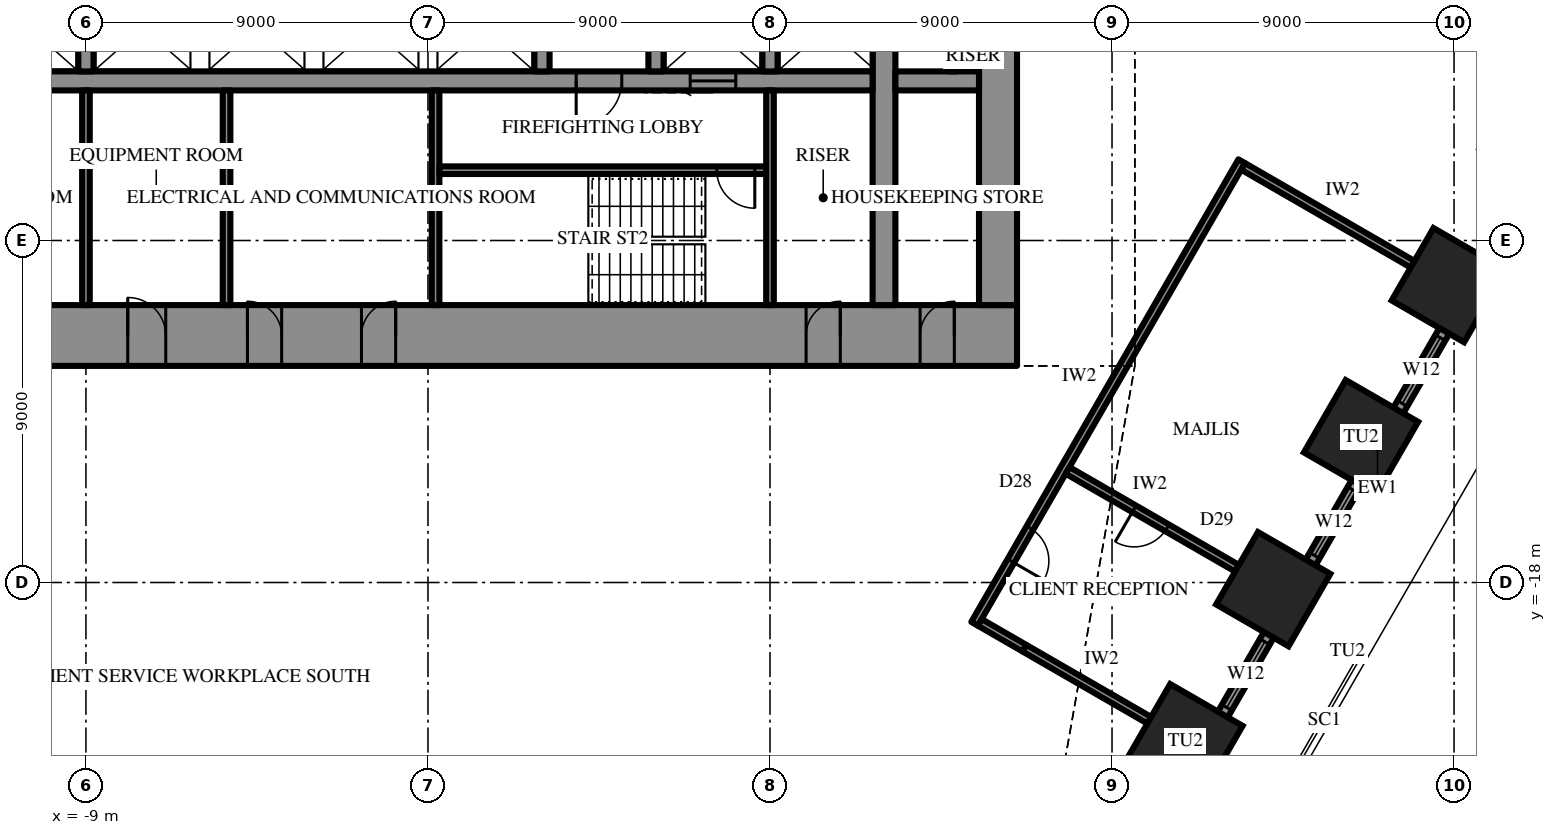
"""IFC4 building model, lengths in metres.
Left out: names, types, materials, properties, quantities, classifications, styles, units other than length and angle.
Written with IfcOpenShell. Run it as: python <this file> out.ifc"""

import sys

from ifc_helpers import new_model, si_unit, direction, frame, frame_2d, origin, origin_2d, place, context, subcontext, project, spatial, rectangle, hollow_rectangle, extrude, element, fill, save


model = new_model("IFC4")
c1 = context("Model", 3, precision=1e-05, world=origin(), true_north=direction((0.0, 1.0)))
c2 = subcontext(c1, "Body", "Model", "MODEL_VIEW")
j1 = project(units=[si_unit("LENGTHUNIT", "METRE"), si_unit("PLANEANGLEUNIT", "RADIAN")], contexts=[c1])
p1 = place(None, origin())
s1 = spatial("IfcSite", under=j1, at=p1, CompositionType="ELEMENT")
p2 = place(p1, origin())
s2 = spatial("IfcBuilding", under=s1, at=p2, CompositionType="ELEMENT")
p3 = place(p2, frame((0.0, 0.0, 215.5)))
s3 = spatial("IfcBuildingStorey", under=s2, at=p3, CompositionType="ELEMENT", Elevation=215.5)
for number, where, z_axis, x_axis in (
    (1, (19.933, -22.175, 0.0), (0.0, 0.0, 1.0), (0.5, 0.866, 0.0)),
    (2, (22.242, -18.175, 0.0), (0.0, 0.0, 1.0), (0.5, 0.866, 0.0)),
    (3, (24.552, -14.175, 0.0), (0.0, 0.0, 1.0), (0.5, 0.866, 0.0)),
    (4, (26.861, -10.175, 0.0), (0.0, 0.0, 1.0), (0.5, 0.866, 0.0)),
):
    element("IfcColumn", number, at=place(p3, frame(where, z_axis=z_axis, x_axis=x_axis)), inside=s3, PredefinedType="COLUMN", context=c2, shape_type="SweptSolid", body=[
        extrude(hollow_rectangle(XDim=2.2, YDim=2.2, WallThickness=0.12, at=origin_2d()), origin(), (0.0, 0.0, 1.0), 4.2),
    ])
p4 = place(p3, frame((15.5, -11.5, 0.0), z_axis=(0.0, 0.0, 1.0), x_axis=(-1.0, 0.0, 0.0)))
e5 = element("IfcWall", 5, at=p4, inside=s3, PredefinedType="SHEAR", context=c2, shape_type="SweptSolid", body=[
    extrude(rectangle(XDim=31.0, YDim=1.6, at=frame_2d((15.5, 0.0))), origin(), (0.0, 0.0, 1.0), 4.2),
])
p5 = place(p4, frame((16.35, 0.0, 0.0)))
e6 = element("IfcOpeningElement", 6, at=p5, cuts=e5, PredefinedType="OPENING", context=c2, shape_type="SweptSolid", body=[
    extrude(rectangle(XDim=0.9, YDim=2.2, at=frame_2d((0.45, 1.1))), frame((0.0, 0.81, 0.0), z_axis=(0.0, -1.0, 0.0), x_axis=(1.0, 0.0, 0.0)), (0.0, 0.0, 1.0), 1.62),
])
p6 = place(p4, frame((19.35, 0.0, 0.0)))
e7 = element("IfcOpeningElement", 7, at=p6, cuts=e5, PredefinedType="OPENING", context=c2, shape_type="SweptSolid", body=[
    extrude(rectangle(XDim=0.9, YDim=2.2, at=frame_2d((0.45, 1.1))), frame((0.0, 0.81, 0.0), z_axis=(0.0, -1.0, 0.0), x_axis=(1.0, 0.0, 0.0)), (0.0, 0.0, 1.0), 1.62),
])
p7 = place(p4, frame((22.4, 0.0, 0.0)))
e8 = element("IfcOpeningElement", 8, at=p7, cuts=e5, PredefinedType="OPENING", context=c2, shape_type="SweptSolid", body=[
    extrude(rectangle(XDim=1.0, YDim=2.2, at=frame_2d((0.5, 1.1))), frame((0.0, 0.81, 0.0), z_axis=(0.0, -1.0, 0.0), x_axis=(1.0, 0.0, 0.0)), (0.0, 0.0, 1.0), 1.62),
])
p8 = place(p4, frame((1.65, 0.0, 0.0)))
e9 = element("IfcOpeningElement", 9, at=p8, cuts=e5, PredefinedType="OPENING", context=c2, shape_type="SweptSolid", body=[
    extrude(rectangle(XDim=0.9, YDim=2.2, at=frame_2d((0.45, 1.1))), frame((0.0, 0.81, 0.0), z_axis=(0.0, -1.0, 0.0), x_axis=(1.0, 0.0, 0.0)), (0.0, 0.0, 1.0), 1.62),
])
p9 = place(p4, frame((4.65, 0.0, 0.0)))
e10 = element("IfcOpeningElement", 10, at=p9, cuts=e5, PredefinedType="OPENING", context=c2, shape_type="SweptSolid", body=[
    extrude(rectangle(XDim=0.9, YDim=2.2, at=frame_2d((0.45, 1.1))), frame((0.0, 0.81, 0.0), z_axis=(0.0, -1.0, 0.0), x_axis=(1.0, 0.0, 0.0)), (0.0, 0.0, 1.0), 1.62),
])
p10 = place(p4, frame((25.45, 0.0, 0.0)))
e11 = element("IfcOpeningElement", 11, at=p10, cuts=e5, PredefinedType="OPENING", context=c2, shape_type="SweptSolid", body=[
    extrude(rectangle(XDim=0.9, YDim=2.2, at=frame_2d((0.45, 1.1))), frame((0.0, 0.81, 0.0), z_axis=(0.0, -1.0, 0.0), x_axis=(1.0, 0.0, 0.0)), (0.0, 0.0, 1.0), 1.62),
])
p11 = place(p4, frame((28.45, 0.0, 0.0)))
e12 = element("IfcOpeningElement", 12, at=p11, cuts=e5, PredefinedType="OPENING", context=c2, shape_type="SweptSolid", body=[
    extrude(rectangle(XDim=0.9, YDim=2.2, at=frame_2d((0.45, 1.1))), frame((0.0, 0.81, 0.0), z_axis=(0.0, -1.0, 0.0), x_axis=(1.0, 0.0, 0.0)), (0.0, 0.0, 1.0), 1.62),
])
p12 = place(p3, frame((15.0, -10.7, 0.0), z_axis=(0.0, 0.0, 1.0), x_axis=(0.0, 1.0, 0.0)))
e13 = element("IfcWall", 13, at=p12, inside=s3, PredefinedType="SHEAR", context=c2, shape_type="SweptSolid", body=[
    extrude(rectangle(XDim=21.4, YDim=1.0, at=frame_2d((10.7, 0.0))), origin(), (0.0, 0.0, 1.0), 4.2),
])
p13 = place(p12, frame((9.8, 0.0, 0.0)))
e14 = element("IfcOpeningElement", 14, at=p13, cuts=e13, PredefinedType="OPENING", context=c2, shape_type="SweptSolid", body=[
    extrude(rectangle(XDim=1.8, YDim=2.4, at=frame_2d((0.9, 1.2))), frame((0.0, 0.51, 0.0), z_axis=(0.0, -1.0, 0.0), x_axis=(1.0, 0.0, 0.0)), (0.0, 0.0, 1.0), 1.02),
])
p14 = place(p3, frame((12.0, -10.7, 0.0), z_axis=(0.0, 0.0, 1.0), x_axis=(0.0, 1.0, 0.0)))
e15 = element("IfcWall", 15, at=p14, inside=s3, PredefinedType="SHEAR", context=c2, shape_type="SweptSolid", body=[
    extrude(rectangle(XDim=21.4, YDim=0.6, at=frame_2d((10.7, 0.0))), origin(), (0.0, 0.0, 1.0), 4.2),
])
p15 = place(p14, frame((9.8, 0.0, 0.0)))
e16 = element("IfcOpeningElement", 16, at=p15, cuts=e15, PredefinedType="OPENING", context=c2, shape_type="SweptSolid", body=[
    extrude(rectangle(XDim=1.8, YDim=2.4, at=frame_2d((0.9, 1.2))), frame((0.0, 0.31, 0.0), z_axis=(0.0, -1.0, 0.0), x_axis=(1.0, 0.0, 0.0)), (0.0, 0.0, 1.0), 0.62),
])
p16 = place(p3, frame((14.5, -4.8, 0.0), z_axis=(0.0, 0.0, 1.0), x_axis=(-1.0, 0.0, 0.0)))
e17 = element("IfcWall", 17, at=p16, inside=s3, PredefinedType="SHEAR", context=c2, shape_type="SweptSolid", body=[
    extrude(rectangle(XDim=2.2, YDim=0.5, at=frame_2d((1.1, 0.0))), origin(), (0.0, 0.0, 1.0), 4.2),
])
p17 = place(p3, frame((11.7, -4.8, 0.0), z_axis=(0.0, 0.0, 1.0), x_axis=(-1.0, 0.0, 0.0)))
e18 = element("IfcWall", 18, at=p17, inside=s3, PredefinedType="SHEAR", context=c2, shape_type="SweptSolid", body=[
    extrude(rectangle(XDim=23.4, YDim=0.5, at=frame_2d((11.7, 0.0))), origin(), (0.0, 0.0, 1.0), 4.2),
])
p18 = place(p17, frame((6.6, 0.0, 0.0)))
e19 = element("IfcOpeningElement", 19, at=p18, cuts=e18, PredefinedType="OPENING", context=c2, shape_type="SweptSolid", body=[
    extrude(rectangle(XDim=1.2, YDim=2.2, at=frame_2d((0.6, 1.1))), frame((0.0, 0.26, 0.0), z_axis=(0.0, -1.0, 0.0), x_axis=(1.0, 0.0, 0.0)), (0.0, 0.0, 1.0), 0.52),
])
p19 = place(p17, frame((3.6, 0.0, 0.0)))
e20 = element("IfcOpeningElement", 20, at=p19, cuts=e18, PredefinedType="OPENING", context=c2, shape_type="SweptSolid", body=[
    extrude(rectangle(XDim=1.2, YDim=2.2, at=frame_2d((0.6, 1.1))), frame((0.0, 0.26, 0.0), z_axis=(0.0, -1.0, 0.0), x_axis=(1.0, 0.0, 0.0)), (0.0, 0.0, 1.0), 0.52),
])
for number, where, z_axis, x_axis in (
    (21, (9.0, -2.25, 0.0), (0.0, 0.0, 1.0), (0.0, -1.0, 0.0)),
    (22, (6.0, -2.25, 0.0), (0.0, 0.0, 1.0), (0.0, -1.0, 0.0)),
    (23, (3.0, -2.25, 0.0), (0.0, 0.0, 1.0), (0.0, -1.0, 0.0)),
    (24, (-9.0, -2.25, 0.0), (0.0, 0.0, 1.0), (0.0, -1.0, 0.0)),
):
    element("IfcWall", number, at=place(p3, frame(where, z_axis=z_axis, x_axis=x_axis)), inside=s3, PredefinedType="SHEAR", context=c2, shape_type="SweptSolid", body=[
        extrude(rectangle(XDim=2.3, YDim=0.4, at=frame_2d((1.15, 0.0))), origin(), (0.0, 0.0, 1.0), 4.2),
    ])
p20 = place(p3, frame((0.2, -5.05, 0.0), z_axis=(0.0, 0.0, 1.0), x_axis=(0.0, -1.0, 0.0)))
e25 = element("IfcWall", 25, at=p20, inside=s3, PredefinedType="SHEAR", context=c2, shape_type="SweptSolid", body=[
    extrude(rectangle(XDim=5.65, YDim=0.2, at=frame_2d((2.825, 0.0))), origin(), (0.0, 0.0, 1.0), 4.2),
])
p21 = place(p3, frame((8.9, -7.15, 0.0), z_axis=(0.0, 0.0, 1.0), x_axis=(-1.0, 0.0, 0.0)))
e26 = element("IfcWall", 26, at=p21, inside=s3, PredefinedType="SHEAR", context=c2, shape_type="SweptSolid", body=[
    extrude(rectangle(XDim=8.6, YDim=0.2, at=frame_2d((4.3, 0.0))), origin(), (0.0, 0.0, 1.0), 4.2),
])
p22 = place(p21, frame((0.3, 0.0, 0.0)))
e27 = element("IfcOpeningElement", 27, at=p22, cuts=e26, PredefinedType="OPENING", context=c2, shape_type="SweptSolid", body=[
    extrude(rectangle(XDim=1.0, YDim=2.2, at=frame_2d((0.5, 1.1))), frame((0.0, 0.11, 0.0), z_axis=(0.0, -1.0, 0.0), x_axis=(1.0, 0.0, 0.0)), (0.0, 0.0, 1.0), 0.22),
])
p23 = place(p3, frame((18.057, -26.425, 0.0), z_axis=(0.0, 0.0, 1.0), x_axis=(0.500001051461, 0.866024796723, 0.0)))
e28 = element("IfcWall", 28, at=p23, inside=s3, PredefinedType="SOLIDWALL", context=c2, shape_type="SweptSolid", body=[
    extrude(rectangle(XDim=27.713, YDim=0.3, at=frame_2d((13.856, 0.0))), origin(), (0.0, 0.0, 1.0), 2.0),
])
p24 = place(p23, frame((1.309, 0.0, 0.6)))
e29 = element("IfcOpeningElement", 29, at=p24, cuts=e28, PredefinedType="OPENING", context=c2, shape_type="SweptSolid", body=[
    extrude(rectangle(XDim=2.0, YDim=1.15, at=frame_2d((1.0, 0.575))), frame((0.0, 0.16, 0.0), z_axis=(0.0, -1.0, 0.0), x_axis=(1.0, 0.0, 0.0)), (0.0, 0.0, 1.0), 0.32),
])
p25 = place(p23, frame((5.928, 0.0, 0.6)))
e30 = element("IfcOpeningElement", 30, at=p25, cuts=e28, PredefinedType="OPENING", context=c2, shape_type="SweptSolid", body=[
    extrude(rectangle(XDim=2.0, YDim=1.15, at=frame_2d((1.0, 0.575))), frame((0.0, 0.16, 0.0), z_axis=(0.0, -1.0, 0.0), x_axis=(1.0, 0.0, 0.0)), (0.0, 0.0, 1.0), 0.32),
])
p26 = place(p23, frame((10.547, 0.0, 0.6)))
e31 = element("IfcOpeningElement", 31, at=p26, cuts=e28, PredefinedType="OPENING", context=c2, shape_type="SweptSolid", body=[
    extrude(rectangle(XDim=2.0, YDim=1.15, at=frame_2d((1.0, 0.575))), frame((0.0, 0.16, 0.0), z_axis=(0.0, -1.0, 0.0), x_axis=(1.0, 0.0, 0.0)), (0.0, 0.0, 1.0), 0.32),
])
p27 = place(p23, frame((15.166, 0.0, 0.6)))
e32 = element("IfcOpeningElement", 32, at=p27, cuts=e28, PredefinedType="OPENING", context=c2, shape_type="SweptSolid", body=[
    extrude(rectangle(XDim=2.0, YDim=1.15, at=frame_2d((1.0, 0.575))), frame((0.0, 0.16, 0.0), z_axis=(0.0, -1.0, 0.0), x_axis=(1.0, 0.0, 0.0)), (0.0, 0.0, 1.0), 0.32),
])
p28 = place(p23, frame((19.785, 0.0, 0.6)))
e33 = element("IfcOpeningElement", 33, at=p28, cuts=e28, PredefinedType="OPENING", context=c2, shape_type="SweptSolid", body=[
    extrude(rectangle(XDim=2.0, YDim=1.15, at=frame_2d((1.0, 0.575))), frame((0.0, 0.16, 0.0), z_axis=(0.0, -1.0, 0.0), x_axis=(1.0, 0.0, 0.0)), (0.0, 0.0, 1.0), 0.32),
])
p29 = place(p23, frame((24.403, 0.0, 0.6)))
e34 = element("IfcOpeningElement", 34, at=p29, cuts=e28, PredefinedType="OPENING", context=c2, shape_type="SweptSolid", body=[
    extrude(rectangle(XDim=2.0, YDim=1.15, at=frame_2d((1.0, 0.575))), frame((0.0, 0.16, 0.0), z_axis=(0.0, -1.0, 0.0), x_axis=(1.0, 0.0, 0.0)), (0.0, 0.0, 1.0), 0.32),
])
for number, where, z_axis, x_axis in (
    (35, (9.0, -5.05, 0.0), (0.0, 0.0, 1.0), (0.0, -1.0, 0.0)),
    (36, (-9.0, -5.05, 0.0), (0.0, 0.0, 1.0), (0.0, -1.0, 0.0)),
    (37, (-5.3, -5.05, 0.0), (0.0, 0.0, 1.0), (0.0, -1.0, 0.0)),
):
    element("IfcWall", number, at=place(p3, frame(where, z_axis=z_axis, x_axis=x_axis)), inside=s3, PredefinedType="PARTITIONING", context=c2, shape_type="SweptSolid", body=[
        extrude(rectangle(XDim=5.65, YDim=0.2, at=frame_2d((2.825, 0.0))), origin(), (0.0, 0.0, 1.0), 4.0),
    ])
p30 = place(p3, frame((13.8, -3.55, 0.0), z_axis=(0.0, 0.0, 1.0), x_axis=(0.0, -1.0, 0.0)))
e38 = element("IfcWall", 38, at=p30, inside=s3, PredefinedType="PARTITIONING", context=c2, shape_type="SweptSolid", body=[
    extrude(rectangle(XDim=1.0, YDim=0.2, at=frame_2d((0.5, 0.0))), origin(), (0.0, 0.0, 1.0), 4.0),
])
p31 = place(p3, frame((14.384, -19.087, 0.0), z_axis=(0.0, 0.0, 1.0), x_axis=(0.499989069193, 0.866031714597, 0.0)))
e39 = element("IfcWall", 39, at=p31, inside=s3, PredefinedType="PARTITIONING", context=c2, shape_type="SweptSolid", body=[
    extrude(rectangle(XDim=14.056, YDim=0.2, at=frame_2d((7.028, 0.0))), origin(), (0.0, 0.0, 1.0), 4.0),
])
p32 = place(p31, frame((1.909, 0.0, 0.0)))
e40 = element("IfcOpeningElement", 40, at=p32, cuts=e39, PredefinedType="OPENING", context=c2, shape_type="SweptSolid", body=[
    extrude(rectangle(XDim=1.0, YDim=2.2, at=frame_2d((0.5, 1.1))), frame((0.0, 0.11, 0.0), z_axis=(0.0, -1.0, 0.0), x_axis=(1.0, 0.0, 0.0)), (0.0, 0.0, 1.0), 0.22),
])
p33 = place(p3, frame((14.52, -19.05, 0.0), z_axis=(0.0, 0.0, 1.0), x_axis=(0.866041729639, -0.499971721724, 0.0)))
e41 = element("IfcWall", 41, at=p33, inside=s3, PredefinedType="PARTITIONING", context=c2, shape_type="SweptSolid", body=[
    extrude(rectangle(XDim=1.356, YDim=0.2, at=frame_2d((0.678, 0.0))), origin(), (0.0, 0.0, 1.0), 4.0),
])
p34 = place(p3, frame((15.695, -19.728, 0.0), z_axis=(0.0, 0.0, 1.0), x_axis=(0.866036622013, -0.499980568954, 0.0)))
e42 = element("IfcWall", 42, at=p34, inside=s3, PredefinedType="PARTITIONING", context=c2, shape_type="SweptSolid", body=[
    extrude(rectangle(XDim=3.794, YDim=0.2, at=frame_2d((1.897, 0.0))), origin(), (0.0, 0.0, 1.0), 3.082),
])
p35 = place(p3, frame((16.83, -15.05, 0.0), z_axis=(0.0, 0.0, 1.0), x_axis=(0.866026116456, -0.499998765615, 0.0)))
e43 = element("IfcWall", 43, at=p35, inside=s3, PredefinedType="PARTITIONING", context=c2, shape_type="SweptSolid", body=[
    extrude(rectangle(XDim=5.15, YDim=0.2, at=frame_2d((2.575, 0.0))), origin(), (0.0, 0.0, 1.0), 3.082),
])
p36 = place(p35, frame((2.025, 0.0, 0.0)))
e44 = element("IfcOpeningElement", 44, at=p36, cuts=e43, PredefinedType="OPENING", context=c2, shape_type="SweptSolid", body=[
    extrude(rectangle(XDim=1.0, YDim=2.2, at=frame_2d((0.5, 1.1))), frame((0.0, 0.11, 0.0), z_axis=(0.0, -1.0, 0.0), x_axis=(1.0, 0.0, 0.0)), (0.0, 0.0, 1.0), 0.22),
])
p37 = place(p3, frame((21.448, -7.05, 0.0), z_axis=(0.0, 0.0, 1.0), x_axis=(0.866037967349, -0.499978238636, 0.0)))
e45 = element("IfcWall", 45, at=p37, inside=s3, PredefinedType="PARTITIONING", context=c2, shape_type="SweptSolid", body=[
    extrude(rectangle(XDim=5.15, YDim=0.2, at=frame_2d((2.575, 0.0))), origin(), (0.0, 0.0, 1.0), 3.082),
])
p38 = place(p25, origin())
e46 = element("IfcWindow", 46, at=p38, inside=s3, PartitioningType="SINGLE_PANEL", PredefinedType="WINDOW", context=c2, shape_type="SweptSolid", body=[
    extrude(rectangle(XDim=2.0, YDim=1.15, at=frame_2d((1.0, 0.575))), frame((0.0, 0.03, 0.0), z_axis=(0.0, -1.0, 0.0), x_axis=(1.0, 0.0, 0.0)), (0.0, 0.0, 1.0), 0.06),
])
fill(e30, e46)
p39 = place(p26, origin())
e47 = element("IfcWindow", 47, at=p39, inside=s3, PartitioningType="SINGLE_PANEL", PredefinedType="WINDOW", context=c2, shape_type="SweptSolid", body=[
    extrude(rectangle(XDim=2.0, YDim=1.15, at=frame_2d((1.0, 0.575))), frame((0.0, 0.03, 0.0), z_axis=(0.0, -1.0, 0.0), x_axis=(1.0, 0.0, 0.0)), (0.0, 0.0, 1.0), 0.06),
])
fill(e31, e47)
p40 = place(p27, origin())
e48 = element("IfcWindow", 48, at=p40, inside=s3, PartitioningType="SINGLE_PANEL", PredefinedType="WINDOW", context=c2, shape_type="SweptSolid", body=[
    extrude(rectangle(XDim=2.0, YDim=1.15, at=frame_2d((1.0, 0.575))), frame((0.0, 0.03, 0.0), z_axis=(0.0, -1.0, 0.0), x_axis=(1.0, 0.0, 0.0)), (0.0, 0.0, 1.0), 0.06),
])
fill(e32, e48)
p41 = place(p18, origin())
e49 = element("IfcDoor", 49, at=p41, inside=s3, OperationType="SINGLE_SWING_LEFT", PredefinedType="DOOR", context=c2, shape_type="SweptSolid", body=[
    extrude(rectangle(XDim=1.2, YDim=2.2, at=frame_2d((0.6, 1.1))), frame((0.0, 0.025, 0.0), z_axis=(0.0, -1.0, 0.0), x_axis=(1.0, 0.0, 0.0)), (0.0, 0.0, 1.0), 0.05),
])
fill(e19, e49)
p42 = place(p22, origin())
e50 = element("IfcDoor", 50, at=p42, inside=s3, OperationType="SINGLE_SWING_RIGHT", PredefinedType="DOOR", context=c2, shape_type="SweptSolid", body=[
    extrude(rectangle(XDim=1.0, YDim=2.2, at=frame_2d((0.5, 1.1))), frame((0.0, 0.025, 0.0), z_axis=(0.0, -1.0, 0.0), x_axis=(1.0, 0.0, 0.0)), (0.0, 0.0, 1.0), 0.05),
])
fill(e27, e50)
p43 = place(p5, frame((0.9, 0.0, 0.0), z_axis=(0.0, 0.0, 1.0), x_axis=(-1.0, 0.0, 0.0)))
e51 = element("IfcDoor", 51, at=p43, inside=s3, OperationType="SINGLE_SWING_LEFT", PredefinedType="DOOR", context=c2, shape_type="SweptSolid", body=[
    extrude(rectangle(XDim=0.9, YDim=2.2, at=frame_2d((0.45, 1.1))), frame((0.0, 0.025, 0.0), z_axis=(0.0, -1.0, 0.0), x_axis=(1.0, 0.0, 0.0)), (0.0, 0.0, 1.0), 0.05),
])
fill(e6, e51)
p44 = place(p6, frame((0.9, 0.0, 0.0), z_axis=(0.0, 0.0, 1.0), x_axis=(-1.0, 0.0, 0.0)))
e52 = element("IfcDoor", 52, at=p44, inside=s3, OperationType="SINGLE_SWING_RIGHT", PredefinedType="DOOR", context=c2, shape_type="SweptSolid", body=[
    extrude(rectangle(XDim=0.9, YDim=2.2, at=frame_2d((0.45, 1.1))), frame((0.0, 0.025, 0.0), z_axis=(0.0, -1.0, 0.0), x_axis=(1.0, 0.0, 0.0)), (0.0, 0.0, 1.0), 0.05),
])
fill(e7, e52)
p45 = place(p7, frame((1.0, 0.0, 0.0), z_axis=(0.0, 0.0, 1.0), x_axis=(-1.0, 0.0, 0.0)))
e53 = element("IfcDoor", 53, at=p45, inside=s3, OperationType="SINGLE_SWING_RIGHT", PredefinedType="DOOR", context=c2, shape_type="SweptSolid", body=[
    extrude(rectangle(XDim=1.0, YDim=2.2, at=frame_2d((0.5, 1.1))), frame((0.0, 0.025, 0.0), z_axis=(0.0, -1.0, 0.0), x_axis=(1.0, 0.0, 0.0)), (0.0, 0.0, 1.0), 0.05),
])
fill(e8, e53)
p46 = place(p8, frame((0.9, 0.0, 0.0), z_axis=(0.0, 0.0, 1.0), x_axis=(-1.0, 0.0, 0.0)))
e54 = element("IfcDoor", 54, at=p46, inside=s3, OperationType="SINGLE_SWING_LEFT", PredefinedType="DOOR", context=c2, shape_type="SweptSolid", body=[
    extrude(rectangle(XDim=0.9, YDim=2.2, at=frame_2d((0.45, 1.1))), frame((0.0, 0.025, 0.0), z_axis=(0.0, -1.0, 0.0), x_axis=(1.0, 0.0, 0.0)), (0.0, 0.0, 1.0), 0.05),
])
fill(e9, e54)
p47 = place(p9, frame((0.9, 0.0, 0.0), z_axis=(0.0, 0.0, 1.0), x_axis=(-1.0, 0.0, 0.0)))
e55 = element("IfcDoor", 55, at=p47, inside=s3, OperationType="SINGLE_SWING_LEFT", PredefinedType="DOOR", context=c2, shape_type="SweptSolid", body=[
    extrude(rectangle(XDim=0.9, YDim=2.2, at=frame_2d((0.45, 1.1))), frame((0.0, 0.025, 0.0), z_axis=(0.0, -1.0, 0.0), x_axis=(1.0, 0.0, 0.0)), (0.0, 0.0, 1.0), 0.05),
])
fill(e10, e55)
p48 = place(p19, origin())
e56 = element("IfcDoor", 56, at=p48, inside=s3, OperationType="SLIDING_TO_LEFT", PredefinedType="DOOR", context=c2, shape_type="SweptSolid", body=[
    extrude(rectangle(XDim=1.2, YDim=2.2, at=frame_2d((0.6, 1.1))), frame((0.0, 0.025, 0.0), z_axis=(0.0, -1.0, 0.0), x_axis=(1.0, 0.0, 0.0)), (0.0, 0.0, 1.0), 0.05),
])
fill(e20, e56)
p49 = place(p32, frame((1.0, 0.0, 0.0), z_axis=(0.0, 0.0, 1.0), x_axis=(-1.0, 0.0, 0.0)))
e57 = element("IfcDoor", 57, at=p49, inside=s3, OperationType="SINGLE_SWING_LEFT", PredefinedType="DOOR", context=c2, shape_type="SweptSolid", body=[
    extrude(rectangle(XDim=1.0, YDim=2.2, at=frame_2d((0.5, 1.1))), frame((0.0, 0.025, 0.0), z_axis=(0.0, -1.0, 0.0), x_axis=(1.0, 0.0, 0.0)), (0.0, 0.0, 1.0), 0.05),
])
fill(e40, e57)
p50 = place(p36, frame((1.0, 0.0, 0.0), z_axis=(0.0, 0.0, 1.0), x_axis=(-1.0, 0.0, 0.0)))
e58 = element("IfcDoor", 58, at=p50, inside=s3, OperationType="SINGLE_SWING_LEFT", PredefinedType="DOOR", context=c2, shape_type="SweptSolid", body=[
    extrude(rectangle(XDim=1.0, YDim=2.2, at=frame_2d((0.5, 1.1))), frame((0.0, 0.025, 0.0), z_axis=(0.0, -1.0, 0.0), x_axis=(1.0, 0.0, 0.0)), (0.0, 0.0, 1.0), 0.05),
])
fill(e44, e58)
save(model, sys.argv[1])
